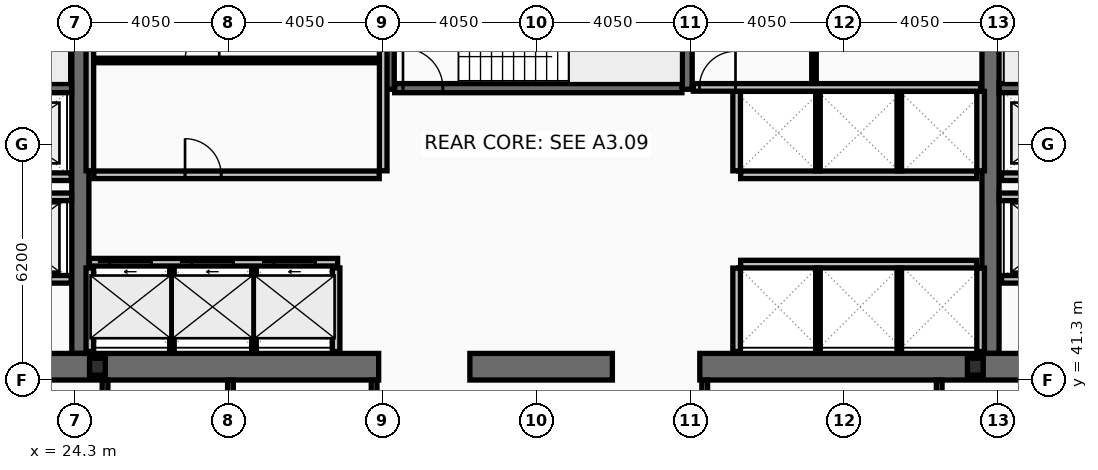
"""IFC4 building model, lengths in metres.
Left out: names, types, materials, properties, quantities, classifications, styles, units other than length and angle.
Written with IfcOpenShell. Run it as: python <this file> out.ifc"""

import sys

from ifc_helpers import new_model, si_unit, direction, frame, frame_2d, origin, origin_2d, place, context, subcontext, project, spatial, rectangle, i_section, extrude, element, fill, save


model = new_model("IFC4")
c1 = context("Model", 3, precision=1e-05, world=origin(), true_north=direction((0.0, 1.0)))
c2 = subcontext(c1, "Body", "Model", "MODEL_VIEW")
j1 = project(units=[si_unit("LENGTHUNIT", "METRE"), si_unit("PLANEANGLEUNIT", "RADIAN")], contexts=[c1])
p1 = place(None, origin())
s1 = spatial("IfcSite", under=j1, at=p1, CompositionType="ELEMENT")
p2 = place(p1, origin())
s2 = spatial("IfcBuilding", under=s1, at=p2, CompositionType="ELEMENT")
p3 = place(p2, frame((0.0, 0.0, 168.6)))
s3 = spatial("IfcBuildingStorey", under=s2, at=p3, CompositionType="ELEMENT", Elevation=168.6)
for number, where, z_axis, x_axis in (
    (1, (24.45, 42.0, 0.0), (0.0, 0.0, 1.0), (0.0, 1.0, 0.0)),
    (2, (48.4, 42.0, 0.0), (0.0, 0.0, 1.0), (0.0, 1.0, 0.0)),
):
    element("IfcWall", number, at=place(p3, frame(where, z_axis=z_axis, x_axis=x_axis)), inside=s3, PredefinedType="SHEAR", context=c2, shape_type="SweptSolid", body=[
        extrude(rectangle(XDim=11.0, YDim=0.45, at=frame_2d((5.5, 0.0))), origin(), (0.0, 0.0, 1.0), 3.38),
    ])
p4 = place(p3, frame((32.3, 41.65, 0.0), z_axis=(0.0, 0.0, 1.0), x_axis=(-1.0, 0.0, 0.0)))
e3 = element("IfcWall", 3, at=p4, inside=s3, PredefinedType="SHEAR", context=c2, shape_type="SweptSolid", body=[
    extrude(rectangle(XDim=11.45, YDim=0.7, at=frame_2d((5.725, 0.0))), origin(), (0.0, 0.0, 1.0), 3.38),
])
p5 = place(p3, frame((38.45, 41.65, 0.0), z_axis=(0.0, 0.0, 1.0), x_axis=(-1.0, 0.0, 0.0)))
e4 = element("IfcWall", 4, at=p5, inside=s3, PredefinedType="SHEAR", context=c2, shape_type="SweptSolid", body=[
    extrude(rectangle(XDim=3.75, YDim=0.7, at=frame_2d((1.875, 0.0))), origin(), (0.0, 0.0, 1.0), 3.38),
])
p6 = place(p3, frame((52.05, 41.65, 0.0), z_axis=(0.0, 0.0, 1.0), x_axis=(-1.0, 0.0, 0.0)))
e5 = element("IfcWall", 5, at=p6, inside=s3, PredefinedType="SHEAR", context=c2, shape_type="SweptSolid", body=[
    extrude(rectangle(XDim=11.3, YDim=0.7, at=frame_2d((5.65, 0.0))), origin(), (0.0, 0.0, 1.0), 3.38),
])
for number, where, z_axis, x_axis in (
    (6, (32.58, 48.95, 0.0), (0.0, 0.0, 1.0), (0.0, 1.0, 0.0)),
    (7, (40.42, 48.95, 0.0), (0.0, 0.0, 1.0), (0.0, 1.0, 0.0)),
):
    element("IfcWall", number, at=place(p3, frame(where, z_axis=z_axis, x_axis=x_axis)), inside=s3, PredefinedType="SHEAR", context=c2, shape_type="SweptSolid", body=[
        extrude(rectangle(XDim=4.05, YDim=0.26, at=frame_2d((2.025, 0.0))), origin(), (0.0, 0.0, 1.0), 3.38),
    ])
p7 = place(p3, frame((16.9, 48.98, 0.0), z_axis=(0.0, 0.0, 1.0), x_axis=(1.0, 0.0, 0.0)))
e8 = element("IfcWall", 8, at=p7, inside=s3, PredefinedType="SHEAR", context=c2, shape_type="SweptSolid", body=[
    extrude(rectangle(XDim=7.32, YDim=0.24, at=frame_2d((3.66, 0.0))), origin(), (0.0, 0.0, 1.0), 3.38),
])
p8 = place(p7, frame((0.22, 0.0, 0.0)))
e9 = element("IfcOpeningElement", 9, at=p8, cuts=e8, PredefinedType="OPENING", context=c2, shape_type="SweptSolid", body=[
    extrude(rectangle(XDim=1.05, YDim=2.15, at=frame_2d((0.525, 1.075))), frame((0.0, 0.13, 0.0), z_axis=(0.0, -1.0, 0.0), x_axis=(1.0, 0.0, 0.0)), (0.0, 0.0, 1.0), 0.26),
])
p9 = place(p3, frame((48.63, 48.98, 0.0), z_axis=(0.0, 0.0, 1.0), x_axis=(1.0, 0.0, 0.0)))
e10 = element("IfcWall", 10, at=p9, inside=s3, PredefinedType="SHEAR", context=c2, shape_type="SweptSolid", body=[
    extrude(rectangle(XDim=7.37, YDim=0.24, at=frame_2d((3.685, 0.0))), origin(), (0.0, 0.0, 1.0), 3.38),
])
p10 = place(p9, frame((6.1, 0.0, 0.0)))
e11 = element("IfcOpeningElement", 11, at=p10, cuts=e10, PredefinedType="OPENING", context=c2, shape_type="SweptSolid", body=[
    extrude(rectangle(XDim=1.05, YDim=2.15, at=frame_2d((0.525, 1.075))), frame((0.0, 0.13, 0.0), z_axis=(0.0, -1.0, 0.0), x_axis=(1.0, 0.0, 0.0)), (0.0, 0.0, 1.0), 0.26),
])
p11 = place(p3, frame((32.72, 48.98, 0.0), z_axis=(0.0, 0.0, 1.0), x_axis=(1.0, 0.0, 0.0)))
e12 = element("IfcWall", 12, at=p11, inside=s3, PredefinedType="SHEAR", context=c2, shape_type="SweptSolid", body=[
    extrude(rectangle(XDim=7.56, YDim=0.24, at=frame_2d((3.78, 0.0))), origin(), (0.0, 0.0, 1.0), 3.38),
])
p12 = place(p11, frame((0.22, 0.0, 0.0)))
e13 = element("IfcOpeningElement", 13, at=p12, cuts=e12, PredefinedType="OPENING", context=c2, shape_type="SweptSolid", body=[
    extrude(rectangle(XDim=1.05, YDim=2.15, at=frame_2d((0.525, 1.075))), frame((0.0, 0.13, 0.0), z_axis=(0.0, -1.0, 0.0), x_axis=(1.0, 0.0, 0.0)), (0.0, 0.0, 1.0), 0.26),
])
for number, where, z_axis, x_axis in (
    (14, (24.9, 41.65, 0.0), (0.0, 0.0, 1.0), (1.0, 0.0, 0.0)),
    (15, (48.0, 41.65, 0.0), (0.0, 0.0, 1.0), (1.0, 0.0, 0.0)),
):
    element("IfcColumn", number, at=place(p3, frame(where, z_axis=z_axis, x_axis=x_axis)), inside=s3, PredefinedType="COLUMN", context=c2, shape_type="SweptSolid", body=[
        extrude(i_section(OverallWidth=0.416, OverallDepth=0.446, WebThickness=0.039, FlangeThickness=0.063, at=origin_2d()), origin(), (0.0, 0.0, 1.0), 3.6),
    ])
p13 = place(p3, frame((24.69, 44.4, 0.0), z_axis=(0.0, 0.0, 1.0), x_axis=(1.0, 0.0, 0.0)))
e16 = element("IfcWall", 16, at=p13, inside=s3, PredefinedType="PARTITIONING", context=c2, shape_type="SweptSolid", body=[
    extrude(rectangle(XDim=6.53, YDim=0.2, at=frame_2d((3.265, 0.0))), origin(), (0.0, 0.0, 1.0), 3.38),
])
p14 = place(p13, frame((0.53, 0.0, 0.0)))
e17 = element("IfcOpeningElement", 17, at=p14, cuts=e16, PredefinedType="OPENING", context=c2, shape_type="SweptSolid", body=[
    extrude(rectangle(XDim=1.1, YDim=2.18, at=frame_2d((0.55, 1.09))), frame((0.0, 0.11, 0.0), z_axis=(0.0, -1.0, 0.0), x_axis=(1.0, 0.0, 0.0)), (0.0, 0.0, 1.0), 0.22),
])
p15 = place(p13, frame((2.69, 0.0, 0.0)))
e18 = element("IfcOpeningElement", 18, at=p15, cuts=e16, PredefinedType="OPENING", context=c2, shape_type="SweptSolid", body=[
    extrude(rectangle(XDim=1.1, YDim=2.18, at=frame_2d((0.55, 1.09))), frame((0.0, 0.11, 0.0), z_axis=(0.0, -1.0, 0.0), x_axis=(1.0, 0.0, 0.0)), (0.0, 0.0, 1.0), 0.22),
])
p16 = place(p13, frame((4.85, 0.0, 0.0)))
e19 = element("IfcOpeningElement", 19, at=p16, cuts=e16, PredefinedType="OPENING", context=c2, shape_type="SweptSolid", body=[
    extrude(rectangle(XDim=1.1, YDim=2.18, at=frame_2d((0.55, 1.09))), frame((0.0, 0.11, 0.0), z_axis=(0.0, -1.0, 0.0), x_axis=(1.0, 0.0, 0.0)), (0.0, 0.0, 1.0), 0.22),
])
p17 = place(p3, frame((51.61, 43.95, 0.0), z_axis=(0.0, 0.0, 1.0), x_axis=(-1.0, 0.0, 0.0)))
e20 = element("IfcWall", 20, at=p17, inside=s3, PredefinedType="PARTITIONING", context=c2, shape_type="SweptSolid", body=[
    extrude(rectangle(XDim=2.92, YDim=0.2, at=frame_2d((1.46, 0.0))), origin(), (0.0, 0.0, 1.0), 3.38),
])
p18 = place(p17, frame((0.81, 0.0, 0.0)))
e21 = element("IfcOpeningElement", 21, at=p18, cuts=e20, PredefinedType="OPENING", context=c2, shape_type="SweptSolid", body=[
    extrude(rectangle(XDim=1.3, YDim=2.18, at=frame_2d((0.65, 1.09))), frame((0.0, 0.11, 0.0), z_axis=(0.0, -1.0, 0.0), x_axis=(1.0, 0.0, 0.0)), (0.0, 0.0, 1.0), 0.22),
])
p19 = place(p3, frame((24.21, 43.95, 0.0), z_axis=(0.0, 0.0, 1.0), x_axis=(-1.0, 0.0, 0.0)))
e22 = element("IfcWall", 22, at=p19, inside=s3, PredefinedType="PARTITIONING", context=c2, shape_type="SweptSolid", body=[
    extrude(rectangle(XDim=2.97, YDim=0.2, at=frame_2d((1.485, 0.0))), origin(), (0.0, 0.0, 1.0), 3.38),
])
p20 = place(p19, frame((0.86, 0.0, 0.0)))
e23 = element("IfcOpeningElement", 23, at=p20, cuts=e22, PredefinedType="OPENING", context=c2, shape_type="SweptSolid", body=[
    extrude(rectangle(XDim=1.3, YDim=2.18, at=frame_2d((0.65, 1.09))), frame((0.0, 0.11, 0.0), z_axis=(0.0, -1.0, 0.0), x_axis=(1.0, 0.0, 0.0)), (0.0, 0.0, 1.0), 0.22),
])
p21 = place(p3, frame((51.61, 46.65, 0.0), z_axis=(0.0, 0.0, 1.0), x_axis=(-1.0, 0.0, 0.0)))
e24 = element("IfcWall", 24, at=p21, inside=s3, PredefinedType="PARTITIONING", context=c2, shape_type="SweptSolid", body=[
    extrude(rectangle(XDim=2.92, YDim=0.2, at=frame_2d((1.46, 0.0))), origin(), (0.0, 0.0, 1.0), 3.38),
])
p22 = place(p21, frame((0.86, 0.0, 0.0)))
e25 = element("IfcOpeningElement", 25, at=p22, cuts=e24, PredefinedType="OPENING", context=c2, shape_type="SweptSolid", body=[
    extrude(rectangle(XDim=1.2, YDim=2.18, at=frame_2d((0.6, 1.09))), frame((0.0, 0.11, 0.0), z_axis=(0.0, -1.0, 0.0), x_axis=(1.0, 0.0, 0.0)), (0.0, 0.0, 1.0), 0.22),
])
p23 = place(p3, frame((24.21, 46.65, 0.0), z_axis=(0.0, 0.0, 1.0), x_axis=(-1.0, 0.0, 0.0)))
e26 = element("IfcWall", 26, at=p23, inside=s3, PredefinedType="PARTITIONING", context=c2, shape_type="SweptSolid", body=[
    extrude(rectangle(XDim=2.97, YDim=0.2, at=frame_2d((1.485, 0.0))), origin(), (0.0, 0.0, 1.0), 3.38),
])
p24 = place(p23, frame((0.91, 0.0, 0.0)))
e27 = element("IfcOpeningElement", 27, at=p24, cuts=e26, PredefinedType="OPENING", context=c2, shape_type="SweptSolid", body=[
    extrude(rectangle(XDim=1.2, YDim=2.18, at=frame_2d((0.6, 1.09))), frame((0.0, 0.11, 0.0), z_axis=(0.0, -1.0, 0.0), x_axis=(1.0, 0.0, 0.0)), (0.0, 0.0, 1.0), 0.22),
])
p25 = place(p3, frame((21.2, 46.12, 0.0), z_axis=(0.0, 0.0, 1.0), x_axis=(1.0, 0.0, 0.0)))
e28 = element("IfcWall", 28, at=p25, inside=s3, PredefinedType="PARTITIONING", context=c2, shape_type="SweptSolid", body=[
    extrude(rectangle(XDim=3.02, YDim=0.2, at=frame_2d((1.51, 0.0))), origin(), (0.0, 0.0, 1.0), 3.38),
])
p26 = place(p3, frame((48.63, 46.12, 0.0), z_axis=(0.0, 0.0, 1.0), x_axis=(1.0, 0.0, 0.0)))
e29 = element("IfcWall", 29, at=p26, inside=s3, PredefinedType="PARTITIONING", context=c2, shape_type="SweptSolid", body=[
    extrude(rectangle(XDim=3.07, YDim=0.2, at=frame_2d((1.535, 0.0))), origin(), (0.0, 0.0, 1.0), 3.38),
])
for number, where, z_axis, x_axis in (
    (30, (24.7, 46.805, 0.0), (0.0, 0.0, 1.0), (0.0, 1.0, 0.0)),
    (31, (32.42, 46.805, 0.0), (0.0, 0.0, 1.0), (0.0, 1.0, 0.0)),
):
    element("IfcWall", number, at=place(p3, frame(where, z_axis=z_axis, x_axis=x_axis)), inside=s3, PredefinedType="PARTITIONING", context=c2, shape_type="SweptSolid", body=[
        extrude(rectangle(XDim=5.99, YDim=0.2, at=frame_2d((2.995, 0.0))), origin(), (0.0, 0.0, 1.0), 3.38),
    ])
p27 = place(p3, frame((24.805, 49.709, 0.0), z_axis=(0.0, 0.0, 1.0), x_axis=(1.0, 0.0, 0.0)))
e32 = element("IfcWall", 32, at=p27, inside=s3, PredefinedType="PARTITIONING", context=c2, shape_type="SweptSolid", body=[
    extrude(rectangle(XDim=7.51, YDim=0.12, at=frame_2d((3.755, 0.0))), origin(), (0.0, 0.0, 1.0), 3.38),
])
p28 = place(p27, frame((2.4, 0.0, 0.0)))
e33 = element("IfcOpeningElement", 33, at=p28, cuts=e32, PredefinedType="OPENING", context=c2, shape_type="SweptSolid", body=[
    extrude(rectangle(XDim=0.9, YDim=2.05, at=frame_2d((0.45, 1.025))), frame((0.0, 0.07, 0.0), z_axis=(0.0, -1.0, 0.0), x_axis=(1.0, 0.0, 0.0)), (0.0, 0.0, 1.0), 0.14),
])
p29 = place(p3, frame((24.805, 46.7, 0.0), z_axis=(0.0, 0.0, 1.0), x_axis=(1.0, 0.0, 0.0)))
e34 = element("IfcWall", 34, at=p29, inside=s3, PredefinedType="PARTITIONING", context=c2, shape_type="SweptSolid", body=[
    extrude(rectangle(XDim=7.51, YDim=0.2, at=frame_2d((3.755, 0.0))), origin(), (0.0, 0.0, 1.0), 3.38),
])
p30 = place(p29, frame((2.4, 0.0, 0.0)))
e35 = element("IfcOpeningElement", 35, at=p30, cuts=e34, PredefinedType="OPENING", context=c2, shape_type="SweptSolid", body=[
    extrude(rectangle(XDim=0.95, YDim=2.1, at=frame_2d((0.475, 1.05))), frame((0.0, 0.11, 0.0), z_axis=(0.0, -1.0, 0.0), x_axis=(1.0, 0.0, 0.0)), (0.0, 0.0, 1.0), 0.22),
])
for number, where, z_axis, x_axis in (
    (36, (24.7, 42.05, 0.0), (0.0, 0.0, 1.0), (0.0, 1.0, 0.0)),
    (37, (31.18, 42.05, 0.0), (0.0, 0.0, 1.0), (0.0, 1.0, 0.0)),
):
    element("IfcWall", number, at=place(p3, frame(where, z_axis=z_axis, x_axis=x_axis)), inside=s3, PredefinedType="PARTITIONING", context=c2, shape_type="SweptSolid", body=[
        extrude(rectangle(XDim=2.2, YDim=0.2, at=frame_2d((1.1, 0.0))), origin(), (0.0, 0.0, 1.0), 3.38),
    ])
for number, where, z_axis, x_axis in (
    (38, (26.86, 42.05, 0.0), (0.0, 0.0, 1.0), (0.0, 1.0, 0.0)),
    (39, (29.02, 42.05, 0.0), (0.0, 0.0, 1.0), (0.0, 1.0, 0.0)),
):
    element("IfcWall", number, at=place(p3, frame(where, z_axis=z_axis, x_axis=x_axis)), inside=s3, PredefinedType="PARTITIONING", context=c2, shape_type="SweptSolid", body=[
        extrude(rectangle(XDim=2.2, YDim=0.12, at=frame_2d((1.1, 0.0))), origin(), (0.0, 0.0, 1.0), 3.38),
    ])
p31 = place(p3, frame((41.825, 46.7, 0.0), z_axis=(0.0, 0.0, 1.0), x_axis=(1.0, 0.0, 0.0)))
e40 = element("IfcWall", 40, at=p31, inside=s3, PredefinedType="PARTITIONING", context=c2, shape_type="SweptSolid", body=[
    extrude(rectangle(XDim=6.21, YDim=0.2, at=frame_2d((3.105, 0.0))), origin(), (0.0, 0.0, 1.0), 3.38),
])
for number, where, z_axis, x_axis in (
    (41, (41.72, 46.805, 0.0), (0.0, 0.0, 1.0), (0.0, 1.0, 0.0)),
    (42, (48.14, 46.805, 0.0), (0.0, 0.0, 1.0), (0.0, 1.0, 0.0)),
):
    element("IfcWall", number, at=place(p3, frame(where, z_axis=z_axis, x_axis=x_axis)), inside=s3, PredefinedType="PARTITIONING", context=c2, shape_type="SweptSolid", body=[
        extrude(rectangle(XDim=2.09, YDim=0.2, at=frame_2d((1.045, 0.0))), origin(), (0.0, 0.0, 1.0), 3.38),
    ])
for number, where, z_axis, x_axis in (
    (43, (43.86, 46.805, 0.0), (0.0, 0.0, 1.0), (0.0, 1.0, 0.0)),
    (44, (46.0, 46.805, 0.0), (0.0, 0.0, 1.0), (0.0, 1.0, 0.0)),
):
    element("IfcWall", number, at=place(p3, frame(where, z_axis=z_axis, x_axis=x_axis)), inside=s3, PredefinedType="PARTITIONING", context=c2, shape_type="SweptSolid", body=[
        extrude(rectangle(XDim=2.09, YDim=0.12, at=frame_2d((1.045, 0.0))), origin(), (0.0, 0.0, 1.0), 3.38),
    ])
p32 = place(p3, frame((41.825, 44.35, 0.0), z_axis=(0.0, 0.0, 1.0), x_axis=(1.0, 0.0, 0.0)))
e45 = element("IfcWall", 45, at=p32, inside=s3, PredefinedType="PARTITIONING", context=c2, shape_type="SweptSolid", body=[
    extrude(rectangle(XDim=6.21, YDim=0.2, at=frame_2d((3.105, 0.0))), origin(), (0.0, 0.0, 1.0), 3.38),
])
for number, where, z_axis, x_axis in (
    (46, (41.72, 42.05, 0.0), (0.0, 0.0, 1.0), (0.0, 1.0, 0.0)),
    (47, (48.14, 42.05, 0.0), (0.0, 0.0, 1.0), (0.0, 1.0, 0.0)),
):
    element("IfcWall", number, at=place(p3, frame(where, z_axis=z_axis, x_axis=x_axis)), inside=s3, PredefinedType="PARTITIONING", context=c2, shape_type="SweptSolid", body=[
        extrude(rectangle(XDim=2.195, YDim=0.2, at=frame_2d((1.098, 0.0))), origin(), (0.0, 0.0, 1.0), 3.38),
    ])
for number, where, z_axis, x_axis in (
    (48, (43.86, 42.05, 0.0), (0.0, 0.0, 1.0), (0.0, 1.0, 0.0)),
    (49, (46.0, 42.05, 0.0), (0.0, 0.0, 1.0), (0.0, 1.0, 0.0)),
):
    element("IfcWall", number, at=place(p3, frame(where, z_axis=z_axis, x_axis=x_axis)), inside=s3, PredefinedType="PARTITIONING", context=c2, shape_type="SweptSolid", body=[
        extrude(rectangle(XDim=2.195, YDim=0.12, at=frame_2d((1.098, 0.0))), origin(), (0.0, 0.0, 1.0), 3.38),
    ])
p33 = place(p3, frame((40.58, 49.0, 0.0), z_axis=(0.0, 0.0, 1.0), x_axis=(1.0, 0.0, 0.0)))
e50 = element("IfcWall", 50, at=p33, inside=s3, PredefinedType="PARTITIONING", context=c2, shape_type="SweptSolid", body=[
    extrude(rectangle(XDim=7.56, YDim=0.2, at=frame_2d((3.78, 0.0))), origin(), (0.0, 0.0, 1.0), 3.38),
])
p34 = place(p33, frame((0.16, 0.0, 0.0)))
e51 = element("IfcOpeningElement", 51, at=p34, cuts=e50, PredefinedType="OPENING", context=c2, shape_type="SweptSolid", body=[
    extrude(rectangle(XDim=0.95, YDim=2.1, at=frame_2d((0.475, 1.05))), frame((0.0, 0.11, 0.0), z_axis=(0.0, -1.0, 0.0), x_axis=(1.0, 0.0, 0.0)), (0.0, 0.0, 1.0), 0.22),
])
p35 = place(p3, frame((43.755, 49.105, 0.0), z_axis=(0.0, 0.0, 1.0), x_axis=(0.0, 1.0, 0.0)))
e52 = element("IfcWall", 52, at=p35, inside=s3, PredefinedType="PARTITIONING", context=c2, shape_type="SweptSolid", body=[
    extrude(rectangle(XDim=3.69, YDim=0.12, at=frame_2d((1.845, 0.0))), origin(), (0.0, 0.0, 1.0), 3.38),
])
p36 = place(p35, frame((1.05, 0.0, 0.0)))
e53 = element("IfcOpeningElement", 53, at=p36, cuts=e52, PredefinedType="OPENING", context=c2, shape_type="SweptSolid", body=[
    extrude(rectangle(XDim=0.9, YDim=2.05, at=frame_2d((0.45, 1.025))), frame((0.0, 0.07, 0.0), z_axis=(0.0, -1.0, 0.0), x_axis=(1.0, 0.0, 0.0)), (0.0, 0.0, 1.0), 0.14),
])
p37 = place(p3, frame((25.1, 38.28, 0.0), z_axis=(0.0, 0.0, 1.0), x_axis=(0.0, 1.0, 0.0)))
e54 = element("IfcWall", 54, at=p37, inside=s3, PredefinedType="PARTITIONING", context=c2, shape_type="SweptSolid", body=[
    extrude(rectangle(XDim=3.02, YDim=0.15, at=frame_2d((1.51, 0.0))), origin(), (0.0, 0.0, 1.0), 2.67),
])
for number, where, z_axis, x_axis in (
    (55, (28.4, 38.28, 0.0), (0.0, 0.0, 1.0), (0.0, 1.0, 0.0)),
    (56, (32.18, 38.28, 0.0), (0.0, 0.0, 1.0), (0.0, 1.0, 0.0)),
    (57, (40.88, 38.28, 0.0), (0.0, 0.0, 1.0), (0.0, 1.0, 0.0)),
    (58, (47.05, 38.28, 0.0), (0.0, 0.0, 1.0), (0.0, 1.0, 0.0)),
):
    element("IfcWall", number, at=place(p3, frame(where, z_axis=z_axis, x_axis=x_axis)), inside=s3, PredefinedType="PARTITIONING", context=c2, shape_type="SweptSolid", body=[
        extrude(rectangle(XDim=3.02, YDim=0.15, at=frame_2d((1.51, 0.0))), origin(), (0.0, 0.0, 1.0), 3.38),
    ])
p38 = place(p12, origin())
e59 = element("IfcDoor", 59, at=p38, inside=s3, OperationType="SINGLE_SWING_LEFT", PredefinedType="DOOR", context=c2, shape_type="SweptSolid", body=[
    extrude(rectangle(XDim=1.05, YDim=2.15, at=frame_2d((0.525, 1.075))), frame((0.0, 0.025, 0.0), z_axis=(0.0, -1.0, 0.0), x_axis=(1.0, 0.0, 0.0)), (0.0, 0.0, 1.0), 0.05),
])
fill(e13, e59)
p39 = place(p14, origin())
e60 = element("IfcDoor", 60, at=p39, inside=s3, OperationType="SLIDING_TO_LEFT", PredefinedType="DOOR", context=c2, shape_type="SweptSolid", body=[
    extrude(rectangle(XDim=1.1, YDim=2.18, at=frame_2d((0.55, 1.09))), frame((0.0, 0.025, 0.0), z_axis=(0.0, -1.0, 0.0), x_axis=(1.0, 0.0, 0.0)), (0.0, 0.0, 1.0), 0.05),
])
fill(e17, e60)
p40 = place(p15, origin())
e61 = element("IfcDoor", 61, at=p40, inside=s3, OperationType="SLIDING_TO_LEFT", PredefinedType="DOOR", context=c2, shape_type="SweptSolid", body=[
    extrude(rectangle(XDim=1.1, YDim=2.18, at=frame_2d((0.55, 1.09))), frame((0.0, 0.025, 0.0), z_axis=(0.0, -1.0, 0.0), x_axis=(1.0, 0.0, 0.0)), (0.0, 0.0, 1.0), 0.05),
])
fill(e18, e61)
p41 = place(p16, origin())
e62 = element("IfcDoor", 62, at=p41, inside=s3, OperationType="SLIDING_TO_LEFT", PredefinedType="DOOR", context=c2, shape_type="SweptSolid", body=[
    extrude(rectangle(XDim=1.1, YDim=2.18, at=frame_2d((0.55, 1.09))), frame((0.0, 0.025, 0.0), z_axis=(0.0, -1.0, 0.0), x_axis=(1.0, 0.0, 0.0)), (0.0, 0.0, 1.0), 0.05),
])
fill(e19, e62)
p42 = place(p28, origin())
e63 = element("IfcDoor", 63, at=p42, inside=s3, OperationType="SINGLE_SWING_RIGHT", PredefinedType="DOOR", context=c2, shape_type="SweptSolid", body=[
    extrude(rectangle(XDim=0.9, YDim=2.05, at=frame_2d((0.45, 1.025))), frame((0.0, 0.025, 0.0), z_axis=(0.0, -1.0, 0.0), x_axis=(1.0, 0.0, 0.0)), (0.0, 0.0, 1.0), 0.05),
])
fill(e33, e63)
p43 = place(p30, origin())
e64 = element("IfcDoor", 64, at=p43, inside=s3, OperationType="SINGLE_SWING_LEFT", PredefinedType="DOOR", context=c2, shape_type="SweptSolid", body=[
    extrude(rectangle(XDim=0.95, YDim=2.1, at=frame_2d((0.475, 1.05))), frame((0.0, 0.025, 0.0), z_axis=(0.0, -1.0, 0.0), x_axis=(1.0, 0.0, 0.0)), (0.0, 0.0, 1.0), 0.05),
])
fill(e35, e64)
p44 = place(p34, origin())
e65 = element("IfcDoor", 65, at=p44, inside=s3, OperationType="SINGLE_SWING_RIGHT", PredefinedType="DOOR", context=c2, shape_type="SweptSolid", body=[
    extrude(rectangle(XDim=0.95, YDim=2.1, at=frame_2d((0.475, 1.05))), frame((0.0, 0.025, 0.0), z_axis=(0.0, -1.0, 0.0), x_axis=(1.0, 0.0, 0.0)), (0.0, 0.0, 1.0), 0.05),
])
fill(e51, e65)
save(model, sys.argv[1])
